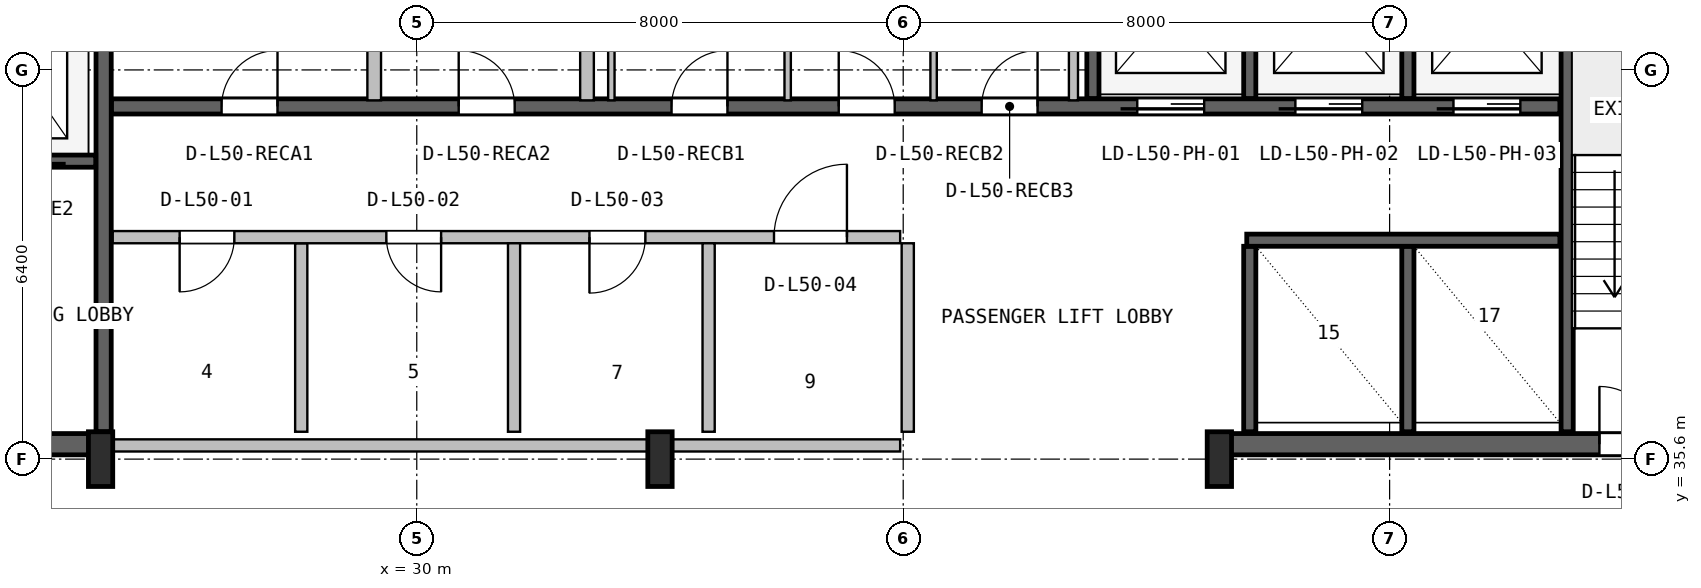
"""IFC4 building model, lengths in metres.
Left out: names, types, materials, properties, quantities, classifications, styles, units other than length and angle.
Written with IfcOpenShell. Run it as: python <this file> out.ifc"""

import sys

from ifc_helpers import new_model, si_unit, direction, frame, frame_2d, origin, origin_2d, place, context, subcontext, project, spatial, rectangle, i_section, extrude, source, transform, mapped, element, fill, save


model = new_model("IFC4")
c1 = context("Model", 3, precision=1e-05, world=origin(), true_north=direction((0.0, 1.0)))
c2 = subcontext(c1, "Body", "Model", "MODEL_VIEW")
j1 = project(units=[si_unit("LENGTHUNIT", "METRE"), si_unit("PLANEANGLEUNIT", "RADIAN")], contexts=[c1])
p1 = place(None, origin())
s1 = spatial("IfcSite", under=j1, at=p1, CompositionType="ELEMENT")
p2 = place(p1, origin())
s2 = spatial("IfcBuilding", under=s1, at=p2, CompositionType="ELEMENT")
p3 = place(p2, frame((0.0, 0.0, 203.6)))
s3 = spatial("IfcBuildingStorey", under=s2, at=p3, CompositionType="ELEMENT", Elevation=203.6)
p4 = place(p3, frame((15.67, 35.845, 0.0), z_axis=(0.0, 0.0, 1.0), x_axis=(1.0, 0.0, 0.0)))
e1 = element("IfcWall", 1, at=p4, inside=s3, PredefinedType="SHEAR", context=c2, shape_type="SweptSolid", body=[
    extrude(rectangle(XDim=9.13, YDim=0.35, at=frame_2d((4.565, 0.0))), origin(), (0.0, 0.0, 1.0), 3.55),
])
p5 = place(p4, frame((5.4, 0.0, 0.0)))
e2 = element("IfcOpeningElement", 2, at=p5, cuts=e1, PredefinedType="OPENING", context=c2, shape_type="SweptSolid", body=[
    extrude(rectangle(XDim=1.0, YDim=2.1, at=frame_2d((0.5, 1.05))), frame((0.0, 0.185, 0.0), z_axis=(0.0, -1.0, 0.0), x_axis=(1.0, 0.0, 0.0)), (0.0, 0.0, 1.0), 0.37),
])
p6 = place(p3, frame((43.2, 35.845, 0.0), z_axis=(0.0, 0.0, 1.0), x_axis=(1.0, 0.0, 0.0)))
e3 = element("IfcWall", 3, at=p6, inside=s3, PredefinedType="SHEAR", context=c2, shape_type="SweptSolid", body=[
    extrude(rectangle(XDim=9.13, YDim=0.35, at=frame_2d((4.565, 0.0))), origin(), (0.0, 0.0, 1.0), 3.55),
])
p7 = place(p6, frame((6.25, 0.0, 0.0)))
e4 = element("IfcOpeningElement", 4, at=p7, cuts=e3, PredefinedType="OPENING", context=c2, shape_type="SweptSolid", body=[
    extrude(rectangle(XDim=0.95, YDim=2.1, at=frame_2d((0.475, 1.05))), frame((0.0, 0.185, 0.0), z_axis=(0.0, -1.0, 0.0), x_axis=(1.0, 0.0, 0.0)), (0.0, 0.0, 1.0), 0.37),
])
m1 = source(origin(), c2, "Body", "SweptSolid", [
    extrude(i_section(OverallWidth=0.4, OverallDepth=0.9, WebThickness=0.016, FlangeThickness=0.028, FilletRadius=0.016, at=origin_2d()), origin(), (0.0, 0.0, 1.0), 3.8),
])
for number, where, z_axis, x_axis in (
    (5, (24.8, 35.6, 0.0), (0.0, 0.0, 1.0), (1.0, 0.0, 0.0)),
    (6, (34.0, 35.6, 0.0), (0.0, 0.0, 1.0), (1.0, 0.0, 0.0)),
    (7, (43.2, 35.6, 0.0), (0.0, 0.0, 1.0), (1.0, 0.0, 0.0)),
):
    element("IfcColumn", number, at=place(p3, frame(where, z_axis=z_axis, x_axis=x_axis)), inside=s3, PredefinedType="COLUMN", context=c2, shape_type="MappedRepresentation", body=[
        mapped(m1, transform((0.0, 0.0, 0.0), x_axis=(1.0, 0.0, 0.0), y_axis=(0.0, 1.0, 0.0), z_axis=(0.0, 0.0, 1.0), scale=1.0)),
    ])
p8 = place(p3, frame((24.85, 36.05, 0.0), z_axis=(0.0, 0.0, 1.0), x_axis=(0.0, 1.0, 0.0)))
e8 = element("IfcWall", 8, at=p8, inside=s3, PredefinedType="SHEAR", context=c2, shape_type="SweptSolid", body=[
    extrude(rectangle(XDim=10.45, YDim=0.25, at=frame_2d((5.225, 0.0))), origin(), (0.0, 0.0, 1.0), 3.55),
])
p9 = place(p3, frame((19.2, 40.5, 0.0), z_axis=(0.0, 0.0, 1.0), x_axis=(1.0, 0.0, 0.0)))
e9 = element("IfcWall", 9, at=p9, inside=s3, PredefinedType="SHEAR", context=c2, shape_type="SweptSolid", body=[
    extrude(rectangle(XDim=5.52, YDim=0.2, at=frame_2d((2.76, 0.0))), origin(), (0.0, 0.0, 1.0), 3.55),
])
p10 = place(p9, frame((1.05, 0.0, 0.0)))
e10 = element("IfcOpeningElement", 10, at=p10, cuts=e9, PredefinedType="OPENING", context=c2, shape_type="SweptSolid", body=[
    extrude(rectangle(XDim=1.1, YDim=2.18, at=frame_2d((0.55, 1.09))), frame((0.0, 0.11, 0.0), z_axis=(0.0, -1.0, 0.0), x_axis=(1.0, 0.0, 0.0)), (0.0, 0.0, 1.0), 0.22),
])
p11 = place(p9, frame((3.65, 0.0, 0.0)))
e11 = element("IfcOpeningElement", 11, at=p11, cuts=e9, PredefinedType="OPENING", context=c2, shape_type="SweptSolid", body=[
    extrude(rectangle(XDim=1.1, YDim=2.18, at=frame_2d((0.55, 1.09))), frame((0.0, 0.11, 0.0), z_axis=(0.0, -1.0, 0.0), x_axis=(1.0, 0.0, 0.0)), (0.0, 0.0, 1.0), 0.22),
])
p12 = place(p3, frame((48.92, 36.05, 0.0), z_axis=(0.0, 0.0, 1.0), x_axis=(0.0, 1.0, 0.0)))
e12 = element("IfcWall", 12, at=p12, inside=s3, PredefinedType="SHEAR", context=c2, shape_type="SweptSolid", body=[
    extrude(rectangle(XDim=10.5, YDim=0.2, at=frame_2d((5.25, 0.0))), origin(), (0.0, 0.0, 1.0), 3.55),
])
p13 = place(p3, frame((24.98, 41.4, 0.0), z_axis=(0.0, 0.0, 1.0), x_axis=(1.0, 0.0, 0.0)))
e13 = element("IfcWall", 13, at=p13, inside=s3, PredefinedType="SHEAR", context=c2, shape_type="SweptSolid", body=[
    extrude(rectangle(XDim=23.82, YDim=0.25, at=frame_2d((11.91, 0.0))), origin(), (0.0, 0.0, 1.0), 3.55),
])
p14 = place(p13, frame((16.87, 0.0, 0.0)))
e14 = element("IfcOpeningElement", 14, at=p14, cuts=e13, PredefinedType="OPENING", context=c2, shape_type="SweptSolid", body=[
    extrude(rectangle(XDim=1.1, YDim=2.18, at=frame_2d((0.55, 1.09))), frame((0.0, 0.135, 0.0), z_axis=(0.0, -1.0, 0.0), x_axis=(1.0, 0.0, 0.0)), (0.0, 0.0, 1.0), 0.27),
])
p15 = place(p13, frame((19.47, 0.0, 0.0)))
e15 = element("IfcOpeningElement", 15, at=p15, cuts=e13, PredefinedType="OPENING", context=c2, shape_type="SweptSolid", body=[
    extrude(rectangle(XDim=1.1, YDim=2.18, at=frame_2d((0.55, 1.09))), frame((0.0, 0.135, 0.0), z_axis=(0.0, -1.0, 0.0), x_axis=(1.0, 0.0, 0.0)), (0.0, 0.0, 1.0), 0.27),
])
p16 = place(p13, frame((22.07, 0.0, 0.0)))
e16 = element("IfcOpeningElement", 16, at=p16, cuts=e13, PredefinedType="OPENING", context=c2, shape_type="SweptSolid", body=[
    extrude(rectangle(XDim=1.1, YDim=2.18, at=frame_2d((0.55, 1.09))), frame((0.0, 0.135, 0.0), z_axis=(0.0, -1.0, 0.0), x_axis=(1.0, 0.0, 0.0)), (0.0, 0.0, 1.0), 0.27),
])
p17 = place(p13, frame((1.81, 0.0, 0.0)))
e17 = element("IfcOpeningElement", 17, at=p17, cuts=e13, PredefinedType="OPENING", context=c2, shape_type="SweptSolid", body=[
    extrude(rectangle(XDim=0.92, YDim=2.08, at=frame_2d((0.46, 1.04))), frame((0.0, 0.135, 0.0), z_axis=(0.0, -1.0, 0.0), x_axis=(1.0, 0.0, 0.0)), (0.0, 0.0, 1.0), 0.27),
])
p18 = place(p13, frame((5.71, 0.0, 0.0)))
e18 = element("IfcOpeningElement", 18, at=p18, cuts=e13, PredefinedType="OPENING", context=c2, shape_type="SweptSolid", body=[
    extrude(rectangle(XDim=0.92, YDim=2.08, at=frame_2d((0.46, 1.04))), frame((0.0, 0.135, 0.0), z_axis=(0.0, -1.0, 0.0), x_axis=(1.0, 0.0, 0.0)), (0.0, 0.0, 1.0), 0.27),
])
p19 = place(p13, frame((9.21, 0.0, 0.0)))
e19 = element("IfcOpeningElement", 19, at=p19, cuts=e13, PredefinedType="OPENING", context=c2, shape_type="SweptSolid", body=[
    extrude(rectangle(XDim=0.92, YDim=2.08, at=frame_2d((0.46, 1.04))), frame((0.0, 0.135, 0.0), z_axis=(0.0, -1.0, 0.0), x_axis=(1.0, 0.0, 0.0)), (0.0, 0.0, 1.0), 0.27),
])
p20 = place(p13, frame((11.96, 0.0, 0.0)))
e20 = element("IfcOpeningElement", 20, at=p20, cuts=e13, PredefinedType="OPENING", context=c2, shape_type="SweptSolid", body=[
    extrude(rectangle(XDim=0.92, YDim=2.08, at=frame_2d((0.46, 1.04))), frame((0.0, 0.135, 0.0), z_axis=(0.0, -1.0, 0.0), x_axis=(1.0, 0.0, 0.0)), (0.0, 0.0, 1.0), 0.27),
])
p21 = place(p13, frame((14.31, 0.0, 0.0)))
e21 = element("IfcOpeningElement", 21, at=p21, cuts=e13, PredefinedType="OPENING", context=c2, shape_type="SweptSolid", body=[
    extrude(rectangle(XDim=0.92, YDim=2.08, at=frame_2d((0.46, 1.04))), frame((0.0, 0.135, 0.0), z_axis=(0.0, -1.0, 0.0), x_axis=(1.0, 0.0, 0.0)), (0.0, 0.0, 1.0), 0.27),
])
p22 = place(p3, frame((41.12, 41.53, 0.0), z_axis=(0.0, 0.0, 1.0), x_axis=(0.0, 1.0, 0.0)))
e22 = element("IfcWall", 22, at=p22, inside=s3, PredefinedType="SHEAR", context=c2, shape_type="SweptSolid", body=[
    extrude(rectangle(XDim=5.02, YDim=0.2, at=frame_2d((2.51, 0.0))), origin(), (0.0, 0.0, 1.0), 3.55),
])
for number, where, z_axis, x_axis in (
    (23, (43.7, 41.53, 0.0), (0.0, 0.0, 1.0), (0.0, 1.0, 0.0)),
    (24, (46.3, 41.53, 0.0), (0.0, 0.0, 1.0), (0.0, 1.0, 0.0)),
):
    element("IfcWall", number, at=place(p3, frame(where, z_axis=z_axis, x_axis=x_axis)), inside=s3, PredefinedType="SHEAR", context=c2, shape_type="SweptSolid", body=[
        extrude(rectangle(XDim=2.87, YDim=0.2, at=frame_2d((1.435, 0.0))), origin(), (0.0, 0.0, 1.0), 3.55),
    ])
for number, where, z_axis, x_axis in (
    (25, (43.7, 36.05, 0.0), (0.0, 0.0, 1.0), (0.0, 1.0, 0.0)),
    (26, (46.3, 36.05, 0.0), (0.0, 0.0, 1.0), (0.0, 1.0, 0.0)),
):
    element("IfcWall", number, at=place(p3, frame(where, z_axis=z_axis, x_axis=x_axis)), inside=s3, PredefinedType="SHEAR", context=c2, shape_type="SweptSolid", body=[
        extrude(rectangle(XDim=3.05, YDim=0.2, at=frame_2d((1.525, 0.0))), origin(), (0.0, 0.0, 1.0), 3.55),
    ])
p23 = place(p3, frame((43.65, 39.2, 0.0), z_axis=(0.0, 0.0, 1.0), x_axis=(1.0, 0.0, 0.0)))
e27 = element("IfcWall", 27, at=p23, inside=s3, PredefinedType="SHEAR", context=c2, shape_type="SweptSolid", body=[
    extrude(rectangle(XDim=5.15, YDim=0.2, at=frame_2d((2.575, 0.0))), origin(), (0.0, 0.0, 1.0), 3.55),
])
p24 = place(p3, frame((25.0, 35.825, 0.0), z_axis=(0.0, 0.0, 1.0), x_axis=(1.0, 0.0, 0.0)))
e28 = element("IfcWall", 28, at=p24, inside=s3, PredefinedType="SOLIDWALL", context=c2, shape_type="SweptSolid", body=[
    extrude(rectangle(XDim=12.95, YDim=0.2, at=frame_2d((6.475, 0.0))), origin(), (0.0, 0.0, 1.0), 2.575),
])
p25 = place(p3, frame((28.1, 36.05, 0.0), z_axis=(0.0, 0.0, 1.0), x_axis=(0.0, 1.0, 0.0)))
e29 = element("IfcWall", 29, at=p25, inside=s3, PredefinedType="PLUMBINGWALL", context=c2, shape_type="SweptSolid", body=[
    extrude(rectangle(XDim=3.1, YDim=0.2, at=frame_2d((1.55, 0.0))), origin(), (0.0, 0.0, 1.0), 3.53),
])
p26 = place(p3, frame((25.0, 39.25, 0.0), z_axis=(0.0, 0.0, 1.0), x_axis=(1.0, 0.0, 0.0)))
e30 = element("IfcWall", 30, at=p26, inside=s3, PredefinedType="SOLIDWALL", context=c2, shape_type="SweptSolid", body=[
    extrude(rectangle(XDim=12.95, YDim=0.2, at=frame_2d((6.475, 0.0))), origin(), (0.0, 0.0, 1.0), 3.53),
])
p27 = place(p26, frame((1.1, 0.0, 0.0)))
e31 = element("IfcOpeningElement", 31, at=p27, cuts=e30, PredefinedType="OPENING", context=c2, shape_type="SweptSolid", body=[
    extrude(rectangle(XDim=0.9, YDim=2.06, at=frame_2d((0.45, 1.03))), frame((0.0, 0.11, 0.0), z_axis=(0.0, -1.0, 0.0), x_axis=(1.0, 0.0, 0.0)), (0.0, 0.0, 1.0), 0.22),
])
p28 = place(p26, frame((4.5, 0.0, 0.0)))
e32 = element("IfcOpeningElement", 32, at=p28, cuts=e30, PredefinedType="OPENING", context=c2, shape_type="SweptSolid", body=[
    extrude(rectangle(XDim=0.9, YDim=2.06, at=frame_2d((0.45, 1.03))), frame((0.0, 0.11, 0.0), z_axis=(0.0, -1.0, 0.0), x_axis=(1.0, 0.0, 0.0)), (0.0, 0.0, 1.0), 0.22),
])
p29 = place(p26, frame((7.84, 0.0, 0.0)))
e33 = element("IfcOpeningElement", 33, at=p29, cuts=e30, PredefinedType="OPENING", context=c2, shape_type="SweptSolid", body=[
    extrude(rectangle(XDim=0.92, YDim=2.08, at=frame_2d((0.46, 1.04))), frame((0.0, 0.11, 0.0), z_axis=(0.0, -1.0, 0.0), x_axis=(1.0, 0.0, 0.0)), (0.0, 0.0, 1.0), 0.22),
])
p30 = place(p26, frame((10.875, 0.0, 0.0)))
e34 = element("IfcOpeningElement", 34, at=p30, cuts=e30, PredefinedType="OPENING", context=c2, shape_type="SweptSolid", body=[
    extrude(rectangle(XDim=1.2, YDim=2.1, at=frame_2d((0.6, 1.05))), frame((0.0, 0.11, 0.0), z_axis=(0.0, -1.0, 0.0), x_axis=(1.0, 0.0, 0.0)), (0.0, 0.0, 1.0), 0.22),
])
p31 = place(p3, frame((31.6, 36.05, 0.0), z_axis=(0.0, 0.0, 1.0), x_axis=(0.0, 1.0, 0.0)))
e35 = element("IfcWall", 35, at=p31, inside=s3, PredefinedType="PLUMBINGWALL", context=c2, shape_type="SweptSolid", body=[
    extrude(rectangle(XDim=3.1, YDim=0.2, at=frame_2d((1.55, 0.0))), origin(), (0.0, 0.0, 1.0), 3.53),
])
for number, where, z_axis, x_axis in (
    (36, (34.8, 36.05, 0.0), (0.0, 0.0, 1.0), (0.0, 1.0, 0.0)),
    (37, (38.075, 36.05, 0.0), (0.0, 0.0, 1.0), (0.0, 1.0, 0.0)),
):
    element("IfcWall", number, at=place(p3, frame(where, z_axis=z_axis, x_axis=x_axis)), inside=s3, PredefinedType="SOLIDWALL", context=c2, shape_type="SweptSolid", body=[
        extrude(rectangle(XDim=3.1, YDim=0.2, at=frame_2d((1.55, 0.0))), origin(), (0.0, 0.0, 1.0), 3.53),
    ])
p32 = place(p3, frame((29.3, 41.5, 0.0), z_axis=(0.0, 0.0, 1.0), x_axis=(0.0, 1.0, 0.0)))
e38 = element("IfcWall", 38, at=p32, inside=s3, PredefinedType="PARTITIONING", context=c2, shape_type="SweptSolid", body=[
    extrude(rectangle(XDim=2.288, YDim=0.225, at=frame_2d((1.144, 0.0))), origin(), (0.0, 0.0, 1.0), 3.53),
])
p33 = place(p3, frame((32.8, 41.5, 0.0), z_axis=(0.0, 0.0, 1.0), x_axis=(0.0, 1.0, 0.0)))
e39 = element("IfcWall", 39, at=p33, inside=s3, PredefinedType="PARTITIONING", context=c2, shape_type="SweptSolid", body=[
    extrude(rectangle(XDim=5.02, YDim=0.225, at=frame_2d((2.51, 0.0))), origin(), (0.0, 0.0, 1.0), 3.53),
])
for number, where, z_axis, x_axis in (
    (40, (36.1, 41.5, 0.0), (0.0, 0.0, 1.0), (0.0, 1.0, 0.0)),
    (41, (33.2, 41.5, 0.0), (0.0, 0.0, 1.0), (0.0, 1.0, 0.0)),
    (42, (38.5, 41.5, 0.0), (0.0, 0.0, 1.0), (0.0, 1.0, 0.0)),
):
    element("IfcWall", number, at=place(p3, frame(where, z_axis=z_axis, x_axis=x_axis)), inside=s3, PredefinedType="PARTITIONING", context=c2, shape_type="SweptSolid", body=[
        extrude(rectangle(XDim=5.02, YDim=0.105, at=frame_2d((2.51, 0.0))), origin(), (0.0, 0.0, 1.0), 3.53),
    ])
p34 = place(p3, frame((40.8, 41.5, 0.0), z_axis=(0.0, 0.0, 1.0), x_axis=(0.0, 1.0, 0.0)))
e43 = element("IfcWall", 43, at=p34, inside=s3, PredefinedType="PARTITIONING", context=c2, shape_type="SweptSolid", body=[
    extrude(rectangle(XDim=5.02, YDim=0.15, at=frame_2d((2.51, 0.0))), origin(), (0.0, 0.0, 1.0), 3.53),
])
m2 = source(origin(), c2, "Body", "SweptSolid", [
    extrude(rectangle(XDim=0.95, YDim=2.1, at=frame_2d((0.475, 1.05))), frame((0.0, 0.025, 0.0), z_axis=(0.0, -1.0, 0.0), x_axis=(1.0, 0.0, 0.0)), (0.0, 0.0, 1.0), 0.05),
])
p35 = place(p7, origin())
e44 = element("IfcDoor", 44, at=p35, inside=s3, OperationType="SINGLE_SWING_LEFT", PredefinedType="DOOR", context=c2, shape_type="MappedRepresentation", body=[
    mapped(m2, transform((0.0, 0.0, 0.0), x_axis=(1.0, 0.0, 0.0), y_axis=(0.0, 1.0, 0.0), z_axis=(0.0, 0.0, 1.0), scale=1.0)),
])
fill(e4, e44)
m3 = source(origin(), c2, "Body", "SweptSolid", [
    extrude(rectangle(XDim=1.1, YDim=2.18, at=frame_2d((0.55, 1.09))), frame((0.0, 0.025, 0.0), z_axis=(0.0, -1.0, 0.0), x_axis=(1.0, 0.0, 0.0)), (0.0, 0.0, 1.0), 0.05),
])
p36 = place(p14, frame((1.1, 0.0, 0.0), z_axis=(0.0, 0.0, 1.0), x_axis=(-1.0, 0.0, 0.0)))
e45 = element("IfcDoor", 45, at=p36, inside=s3, OperationType="SLIDING_TO_LEFT", PredefinedType="DOOR", context=c2, shape_type="MappedRepresentation", body=[
    mapped(m3, transform((0.0, 0.0, 0.0), x_axis=(1.0, 0.0, 0.0), y_axis=(0.0, 1.0, 0.0), z_axis=(0.0, 0.0, 1.0), scale=1.0)),
])
fill(e14, e45)
p37 = place(p15, frame((1.1, 0.0, 0.0), z_axis=(0.0, 0.0, 1.0), x_axis=(-1.0, 0.0, 0.0)))
e46 = element("IfcDoor", 46, at=p37, inside=s3, OperationType="SLIDING_TO_LEFT", PredefinedType="DOOR", context=c2, shape_type="MappedRepresentation", body=[
    mapped(m3, transform((0.0, 0.0, 0.0), x_axis=(1.0, 0.0, 0.0), y_axis=(0.0, 1.0, 0.0), z_axis=(0.0, 0.0, 1.0), scale=1.0)),
])
fill(e15, e46)
p38 = place(p16, frame((1.1, 0.0, 0.0), z_axis=(0.0, 0.0, 1.0), x_axis=(-1.0, 0.0, 0.0)))
e47 = element("IfcDoor", 47, at=p38, inside=s3, OperationType="SLIDING_TO_LEFT", PredefinedType="DOOR", context=c2, shape_type="MappedRepresentation", body=[
    mapped(m3, transform((0.0, 0.0, 0.0), x_axis=(1.0, 0.0, 0.0), y_axis=(0.0, 1.0, 0.0), z_axis=(0.0, 0.0, 1.0), scale=1.0)),
])
fill(e16, e47)
m4 = source(origin(), c2, "Body", "SweptSolid", [
    extrude(rectangle(XDim=0.92, YDim=2.08, at=frame_2d((0.46, 1.04))), frame((0.0, 0.025, 0.0), z_axis=(0.0, -1.0, 0.0), x_axis=(1.0, 0.0, 0.0)), (0.0, 0.0, 1.0), 0.05),
])
p39 = place(p17, origin())
e48 = element("IfcDoor", 48, at=p39, inside=s3, OperationType="SINGLE_SWING_RIGHT", PredefinedType="DOOR", context=c2, shape_type="MappedRepresentation", body=[
    mapped(m4, transform((0.0, 0.0, 0.0), x_axis=(1.0, 0.0, 0.0), y_axis=(0.0, 1.0, 0.0), z_axis=(0.0, 0.0, 1.0), scale=1.0)),
])
fill(e17, e48)
p40 = place(p18, origin())
e49 = element("IfcDoor", 49, at=p40, inside=s3, OperationType="SINGLE_SWING_LEFT", PredefinedType="DOOR", context=c2, shape_type="MappedRepresentation", body=[
    mapped(m4, transform((0.0, 0.0, 0.0), x_axis=(1.0, 0.0, 0.0), y_axis=(0.0, 1.0, 0.0), z_axis=(0.0, 0.0, 1.0), scale=1.0)),
])
fill(e18, e49)
p41 = place(p19, origin())
e50 = element("IfcDoor", 50, at=p41, inside=s3, OperationType="SINGLE_SWING_RIGHT", PredefinedType="DOOR", context=c2, shape_type="MappedRepresentation", body=[
    mapped(m4, transform((0.0, 0.0, 0.0), x_axis=(1.0, 0.0, 0.0), y_axis=(0.0, 1.0, 0.0), z_axis=(0.0, 0.0, 1.0), scale=1.0)),
])
fill(e19, e50)
p42 = place(p20, origin())
e51 = element("IfcDoor", 51, at=p42, inside=s3, OperationType="SINGLE_SWING_LEFT", PredefinedType="DOOR", context=c2, shape_type="MappedRepresentation", body=[
    mapped(m4, transform((0.0, 0.0, 0.0), x_axis=(1.0, 0.0, 0.0), y_axis=(0.0, 1.0, 0.0), z_axis=(0.0, 0.0, 1.0), scale=1.0)),
])
fill(e20, e51)
p43 = place(p21, origin())
e52 = element("IfcDoor", 52, at=p43, inside=s3, OperationType="SINGLE_SWING_RIGHT", PredefinedType="DOOR", context=c2, shape_type="MappedRepresentation", body=[
    mapped(m4, transform((0.0, 0.0, 0.0), x_axis=(1.0, 0.0, 0.0), y_axis=(0.0, 1.0, 0.0), z_axis=(0.0, 0.0, 1.0), scale=1.0)),
])
fill(e21, e52)
m5 = source(origin(), c2, "Body", "SweptSolid", [
    extrude(rectangle(XDim=0.9, YDim=2.06, at=frame_2d((0.45, 1.03))), frame((0.0, 0.025, 0.0), z_axis=(0.0, -1.0, 0.0), x_axis=(1.0, 0.0, 0.0)), (0.0, 0.0, 1.0), 0.05),
])
p44 = place(p27, frame((0.9, 0.0, 0.0), z_axis=(0.0, 0.0, 1.0), x_axis=(-1.0, 0.0, 0.0)))
e53 = element("IfcDoor", 53, at=p44, inside=s3, OperationType="SINGLE_SWING_LEFT", PredefinedType="DOOR", context=c2, shape_type="MappedRepresentation", body=[
    mapped(m5, transform((0.0, 0.0, 0.0), x_axis=(1.0, 0.0, 0.0), y_axis=(0.0, 1.0, 0.0), z_axis=(0.0, 0.0, 1.0), scale=1.0)),
])
fill(e31, e53)
p45 = place(p28, frame((0.9, 0.0, 0.0), z_axis=(0.0, 0.0, 1.0), x_axis=(-1.0, 0.0, 0.0)))
e54 = element("IfcDoor", 54, at=p45, inside=s3, OperationType="SINGLE_SWING_RIGHT", PredefinedType="DOOR", context=c2, shape_type="MappedRepresentation", body=[
    mapped(m5, transform((0.0, 0.0, 0.0), x_axis=(1.0, 0.0, 0.0), y_axis=(0.0, 1.0, 0.0), z_axis=(0.0, 0.0, 1.0), scale=1.0)),
])
fill(e32, e54)
p46 = place(p29, frame((0.92, 0.0, 0.0), z_axis=(0.0, 0.0, 1.0), x_axis=(-1.0, 0.0, 0.0)))
e55 = element("IfcDoor", 55, at=p46, inside=s3, OperationType="SINGLE_SWING_LEFT", PredefinedType="DOOR", context=c2, shape_type="MappedRepresentation", body=[
    mapped(m4, transform((0.0, 0.0, 0.0), x_axis=(1.0, 0.0, 0.0), y_axis=(0.0, 1.0, 0.0), z_axis=(0.0, 0.0, 1.0), scale=1.0)),
])
fill(e33, e55)
m6 = source(origin(), c2, "Body", "SweptSolid", [
    extrude(rectangle(XDim=1.2, YDim=2.1, at=frame_2d((0.6, 1.05))), frame((0.0, 0.025, 0.0), z_axis=(0.0, -1.0, 0.0), x_axis=(1.0, 0.0, 0.0)), (0.0, 0.0, 1.0), 0.05),
])
p47 = place(p30, origin())
e56 = element("IfcDoor", 56, at=p47, inside=s3, OperationType="SINGLE_SWING_RIGHT", PredefinedType="DOOR", context=c2, shape_type="MappedRepresentation", body=[
    mapped(m6, transform((0.0, 0.0, 0.0), x_axis=(1.0, 0.0, 0.0), y_axis=(0.0, 1.0, 0.0), z_axis=(0.0, 0.0, 1.0), scale=1.0)),
])
fill(e34, e56)
save(model, sys.argv[1])
